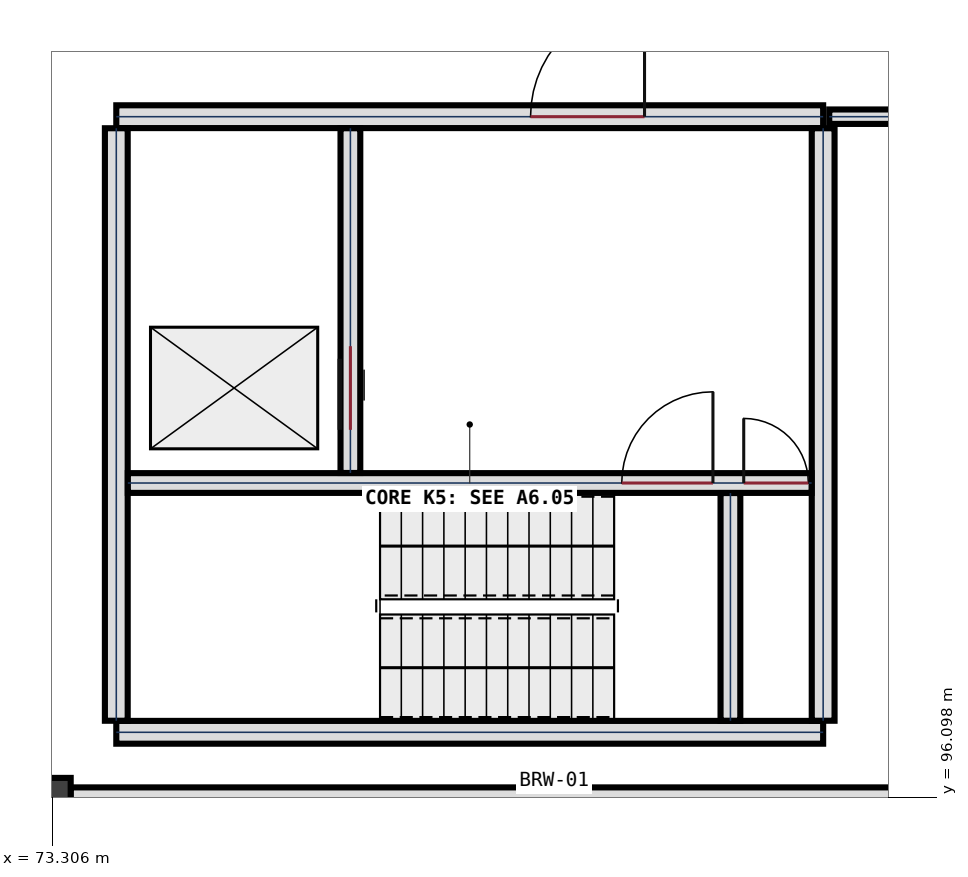
"""IFC4 building model, lengths in metres.
Left out: names, types, materials, properties, quantities, classifications, styles, units other than length and angle.
Written with IfcOpenShell. Run it as: python <this file> out.ifc"""

import sys

from ifc_helpers import new_model, si_unit, direction, frame, frame_2d, origin, origin_2d, place, context, subcontext, project, spatial, rectangle, extrude, element, fill, save


model = new_model("IFC4")
c1 = context("Model", 3, precision=1e-05, world=origin(), true_north=direction((0.0, 1.0)))
c2 = subcontext(c1, "Body", "Model", "MODEL_VIEW")
j1 = project(units=[si_unit("LENGTHUNIT", "METRE"), si_unit("PLANEANGLEUNIT", "RADIAN")], contexts=[c1])
p1 = place(None, origin())
s1 = spatial("IfcSite", under=j1, at=p1, CompositionType="ELEMENT")
p2 = place(p1, origin())
s2 = spatial("IfcBuilding", under=s1, at=p2, CompositionType="ELEMENT")
p3 = place(p2, frame((0.0, 0.0, -8.4)))
s3 = spatial("IfcBuildingStorey", under=s2, at=p3, CompositionType="ELEMENT", Elevation=-8.4)
p4 = place(p3, frame((73.2, 96.0, 0.0), z_axis=(0.0, 0.0, 1.0), x_axis=(1.0, 0.0, 0.0)))
e1 = element("IfcColumn", 1, at=p4, inside=s3, PredefinedType="COLUMN", context=c2, shape_type="SweptSolid", body=[
    extrude(rectangle(XDim=0.7, YDim=0.7, at=origin_2d()), origin(), (0.0, 0.0, 1.0), 4.2),
])
p5 = place(p3, frame((86.277, 96.0, 0.0), z_axis=(0.0, 0.0, 1.0), x_axis=(-1.0, 0.0, 0.0)))
e2 = element("IfcWall", 2, at=p5, inside=s3, PredefinedType="USERDEFINED", context=c2, shape_type="SweptSolid", body=[
    extrude(rectangle(XDim=12.729, YDim=0.45, at=frame_2d((6.365, 0.0))), origin(), (0.0, 0.0, 1.0), 3.9),
])
p6 = place(p3, frame((83.45, 96.95, 0.0), z_axis=(0.0, 0.0, 1.0), x_axis=(-1.0, 0.0, 0.0)))
e3 = element("IfcWall", 3, at=p6, inside=s3, PredefinedType="SHEAR", context=c2, shape_type="SweptSolid", body=[
    extrude(rectangle(XDim=9.3, YDim=0.3, at=frame_2d((4.65, 0.0))), origin(), (0.0, 0.0, 1.0), 4.2),
])
p7 = place(p3, frame((74.15, 105.05, 0.0), z_axis=(0.0, 0.0, 1.0), x_axis=(1.0, 0.0, 0.0)))
e4 = element("IfcWall", 4, at=p7, inside=s3, PredefinedType="SHEAR", context=c2, shape_type="SweptSolid", body=[
    extrude(rectangle(XDim=9.3, YDim=0.3, at=frame_2d((4.65, 0.0))), origin(), (0.0, 0.0, 1.0), 4.2),
])
p8 = place(p7, frame((5.45, 0.0, 0.0)))
e5 = element("IfcOpeningElement", 5, at=p8, cuts=e4, PredefinedType="OPENING", context=c2, shape_type="SweptSolid", body=[
    extrude(rectangle(XDim=1.5, YDim=2.25, at=frame_2d((0.75, 1.125))), frame((0.0, 0.16, 0.0), z_axis=(0.0, -1.0, 0.0), x_axis=(1.0, 0.0, 0.0)), (0.0, 0.0, 1.0), 0.32),
])
for number, where, z_axis, x_axis in (
    (6, (74.15, 97.102, 0.0), (0.0, 0.0, 1.0), (0.0, 1.0, 0.0)),
    (7, (83.45, 104.898, 0.0), (0.0, 0.0, 1.0), (0.0, -1.0, 0.0)),
):
    element("IfcWall", number, at=place(p3, frame(where, z_axis=z_axis, x_axis=x_axis)), inside=s3, PredefinedType="SHEAR", context=c2, shape_type="SweptSolid", body=[
        extrude(rectangle(XDim=7.796, YDim=0.3, at=frame_2d((3.898, 0.0))), origin(), (0.0, 0.0, 1.0), 4.2),
    ])
p9 = place(p3, frame((74.302, 100.23, 0.0), z_axis=(0.0, 0.0, 1.0), x_axis=(1.0, 0.0, 0.0)))
e8 = element("IfcWall", 8, at=p9, inside=s3, PredefinedType="SHEAR", context=c2, shape_type="SweptSolid", body=[
    extrude(rectangle(XDim=8.996, YDim=0.26, at=frame_2d((4.498, 0.0))), origin(), (0.0, 0.0, 1.0), 4.2),
])
p10 = place(p9, frame((6.498, 0.0, 0.0)))
e9 = element("IfcOpeningElement", 9, at=p10, cuts=e8, PredefinedType="OPENING", context=c2, shape_type="SweptSolid", body=[
    extrude(rectangle(XDim=1.2, YDim=2.2, at=frame_2d((0.6, 1.1))), frame((0.0, 0.14, 0.0), z_axis=(0.0, -1.0, 0.0), x_axis=(1.0, 0.0, 0.0)), (0.0, 0.0, 1.0), 0.28),
])
p11 = place(p9, frame((8.103, 0.0, 0.0)))
e10 = element("IfcOpeningElement", 10, at=p11, cuts=e8, PredefinedType="OPENING", context=c2, shape_type="SweptSolid", body=[
    extrude(rectangle(XDim=0.85, YDim=2.05, at=frame_2d((0.425, 1.025))), frame((0.0, 0.14, 0.0), z_axis=(0.0, -1.0, 0.0), x_axis=(1.0, 0.0, 0.0)), (0.0, 0.0, 1.0), 0.28),
])
p12 = place(p3, frame((82.23, 97.102, 0.0), z_axis=(0.0, 0.0, 1.0), x_axis=(0.0, 1.0, 0.0)))
e11 = element("IfcWall", 11, at=p12, inside=s3, PredefinedType="SHEAR", context=c2, shape_type="SweptSolid", body=[
    extrude(rectangle(XDim=2.996, YDim=0.26, at=frame_2d((1.498, 0.0))), origin(), (0.0, 0.0, 1.0), 4.2),
])
p13 = place(p3, frame((77.23, 100.362, 0.0), z_axis=(0.0, 0.0, 1.0), x_axis=(0.0, 1.0, 0.0)))
e12 = element("IfcWall", 12, at=p13, inside=s3, PredefinedType="SHEAR", context=c2, shape_type="SweptSolid", body=[
    extrude(rectangle(XDim=4.536, YDim=0.26, at=frame_2d((2.268, 0.0))), origin(), (0.0, 0.0, 1.0), 4.2),
])
p14 = place(p13, frame((0.568, 0.0, 0.0)))
e13 = element("IfcOpeningElement", 13, at=p14, cuts=e12, PredefinedType="OPENING", context=c2, shape_type="SweptSolid", body=[
    extrude(rectangle(XDim=1.1, YDim=2.15, at=frame_2d((0.55, 1.075))), frame((0.0, 0.14, 0.0), z_axis=(0.0, -1.0, 0.0), x_axis=(1.0, 0.0, 0.0)), (0.0, 0.0, 1.0), 0.28),
])
p15 = place(p3, frame((83.53, 105.05, 0.0), z_axis=(0.0, 0.0, 1.0), x_axis=(1.0, 0.0, 0.0)))
e14 = element("IfcWall", 14, at=p15, inside=s3, PredefinedType="PARTITIONING", context=c2, shape_type="SweptSolid", body=[
    extrude(rectangle(XDim=42.17, YDim=0.19, at=frame_2d((21.085, 0.0))), origin(), (0.0, 0.0, 1.0), 2.89),
])
p16 = place(p15, frame((22.87, 0.0, 0.0)))
e15 = element("IfcOpeningElement", 15, at=p16, cuts=e14, PredefinedType="OPENING", context=c2, shape_type="SweptSolid", body=[
    extrude(rectangle(XDim=1.2, YDim=2.2, at=frame_2d((0.6, 1.1))), frame((0.0, 0.105, 0.0), z_axis=(0.0, -1.0, 0.0), x_axis=(1.0, 0.0, 0.0)), (0.0, 0.0, 1.0), 0.21),
])
p17 = place(p8, origin())
e16 = element("IfcDoor", 16, at=p17, inside=s3, OperationType="SINGLE_SWING_RIGHT", PredefinedType="DOOR", context=c2, shape_type="SweptSolid", body=[
    extrude(rectangle(XDim=1.5, YDim=2.25, at=frame_2d((0.75, 1.125))), frame((0.0, 0.032, 0.0), z_axis=(0.0, -1.0, 0.0), x_axis=(1.0, 0.0, 0.0)), (0.0, 0.0, 1.0), 0.065),
])
fill(e5, e16)
p18 = place(p10, origin())
e17 = element("IfcDoor", 17, at=p18, inside=s3, OperationType="SINGLE_SWING_RIGHT", PredefinedType="DOOR", context=c2, shape_type="SweptSolid", body=[
    extrude(rectangle(XDim=1.2, YDim=2.2, at=frame_2d((0.6, 1.1))), frame((0.0, 0.032, 0.0), z_axis=(0.0, -1.0, 0.0), x_axis=(1.0, 0.0, 0.0)), (0.0, 0.0, 1.0), 0.065),
])
fill(e9, e17)
p19 = place(p11, origin())
e18 = element("IfcDoor", 18, at=p19, inside=s3, OperationType="SINGLE_SWING_LEFT", PredefinedType="DOOR", context=c2, shape_type="SweptSolid", body=[
    extrude(rectangle(XDim=0.85, YDim=2.05, at=frame_2d((0.425, 1.025))), frame((0.0, 0.032, 0.0), z_axis=(0.0, -1.0, 0.0), x_axis=(1.0, 0.0, 0.0)), (0.0, 0.0, 1.0), 0.065),
])
fill(e10, e18)
p20 = place(p14, origin())
e19 = element("IfcDoor", 19, at=p20, inside=s3, OperationType="SLIDING_TO_LEFT", PredefinedType="DOOR", context=c2, shape_type="SweptSolid", body=[
    extrude(rectangle(XDim=1.1, YDim=2.15, at=frame_2d((0.55, 1.075))), frame((0.0, 0.032, 0.0), z_axis=(0.0, -1.0, 0.0), x_axis=(1.0, 0.0, 0.0)), (0.0, 0.0, 1.0), 0.065),
])
fill(e13, e19)
save(model, sys.argv[1])
